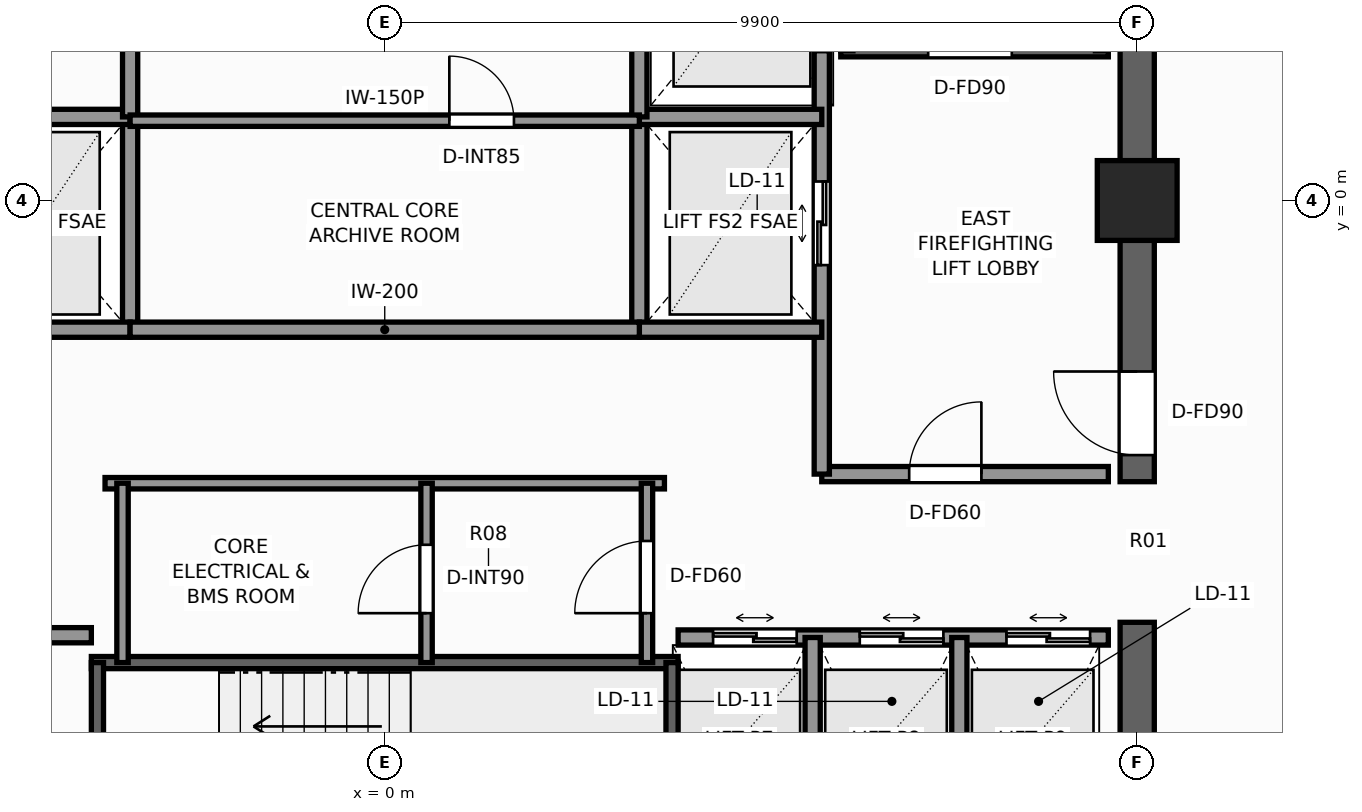
"""IFC4 building model, lengths in metres.
Left out: names, types, materials, properties, quantities, classifications, styles, units other than length and angle.
Written with IfcOpenShell. Run it as: python <this file> out.ifc"""

import sys

from ifc_helpers import new_model, si_unit, direction, frame, frame_2d, origin, origin_2d, place, context, subcontext, project, spatial, rectangle, extrude, element, fill, save


model = new_model("IFC4")
c1 = context("Model", 3, precision=1e-05, world=origin(), true_north=direction((0.0, 1.0)))
c2 = subcontext(c1, "Body", "Model", "MODEL_VIEW")
j1 = project(units=[si_unit("LENGTHUNIT", "METRE"), si_unit("PLANEANGLEUNIT", "RADIAN")], contexts=[c1])
p1 = place(None, origin())
s1 = spatial("IfcSite", under=j1, at=p1, CompositionType="ELEMENT")
p2 = place(p1, origin())
s2 = spatial("IfcBuilding", under=s1, at=p2, CompositionType="ELEMENT")
p3 = place(p2, frame((0.0, 0.0, 237.4)))
s3 = spatial("IfcBuildingStorey", under=s2, at=p3, CompositionType="ELEMENT", Elevation=237.4)
p4 = place(p3, frame((9.9, -9.675, 0.0), z_axis=(0.0, 0.0, 1.0), x_axis=(0.0, 1.0, 0.0)))
e1 = element("IfcWall", 1, at=p4, inside=s3, PredefinedType="SHEAR", context=c2, shape_type="SweptSolid", body=[
    extrude(rectangle(XDim=4.125, YDim=0.45, at=frame_2d((2.062, 0.0))), origin(), (0.0, 0.0, 1.0), 3.5),
])
p5 = place(p3, frame((9.9, -3.7, 0.0), z_axis=(0.0, 0.0, 1.0), x_axis=(0.0, 1.0, 0.0)))
e2 = element("IfcWall", 2, at=p5, inside=s3, PredefinedType="SHEAR", context=c2, shape_type="SweptSolid", body=[
    extrude(rectangle(XDim=13.375, YDim=0.45, at=frame_2d((6.688, 0.0))), origin(), (0.0, 0.0, 1.0), 3.5),
])
p6 = place(p5, frame((0.35, 0.0, 0.0)))
e3 = element("IfcOpeningElement", 3, at=p6, cuts=e2, PredefinedType="OPENING", context=c2, shape_type="SweptSolid", body=[
    extrude(rectangle(XDim=1.1, YDim=2.2, at=frame_2d((0.55, 1.1))), frame((0.0, 0.235, 0.0), z_axis=(0.0, -1.0, 0.0), x_axis=(1.0, 0.0, 0.0)), (0.0, 0.0, 1.0), 0.47),
])
p7 = place(p3, frame((9.9, 0.0, 0.0), z_axis=(0.0, 0.0, 1.0), x_axis=(1.0, 0.0, 0.0)))
e4 = element("IfcColumn", 4, at=p7, inside=s3, PredefinedType="COLUMN", context=c2, shape_type="SweptSolid", body=[
    extrude(rectangle(XDim=1.05, YDim=1.05, at=origin_2d()), origin(), (0.0, 0.0, 1.0), 3.5),
])
p8 = place(p3, frame((6.0, 1.97, 0.0), z_axis=(0.0, 0.0, 1.0), x_axis=(1.0, 0.0, 0.0)))
e5 = element("IfcWall", 5, at=p8, inside=s3, PredefinedType="SHEAR", context=c2, shape_type="SweptSolid", body=[
    extrude(rectangle(XDim=3.52, YDim=0.16, at=frame_2d((1.76, 0.0))), origin(), (0.0, 0.0, 1.0), 3.5),
])
p9 = place(p8, frame((1.15, 0.0, 0.0)))
e6 = element("IfcOpeningElement", 6, at=p9, cuts=e5, PredefinedType="OPENING", context=c2, shape_type="SweptSolid", body=[
    extrude(rectangle(XDim=1.1, YDim=2.2, at=frame_2d((0.55, 1.1))), frame((0.0, 0.09, 0.0), z_axis=(0.0, -1.0, 0.0), x_axis=(1.0, 0.0, 0.0)), (0.0, 0.0, 1.0), 0.18),
])
p10 = place(p3, frame((-3.86, -6.08, 0.0), z_axis=(0.0, 0.0, 1.0), x_axis=(1.0, 0.0, 0.0)))
e7 = element("IfcWall", 7, at=p10, inside=s3, PredefinedType="SHEAR", context=c2, shape_type="SweptSolid", body=[
    extrude(rectangle(XDim=7.72, YDim=0.16, at=frame_2d((3.86, 0.0))), origin(), (0.0, 0.0, 1.0), 3.5),
])
for number, where, z_axis, x_axis in (
    (8, (-3.78, -9.43, 0.0), (0.0, 0.0, 1.0), (0.0, 1.0, 0.0)),
    (9, (3.78, -9.43, 0.0), (0.0, 0.0, 1.0), (0.0, 1.0, 0.0)),
):
    element("IfcWall", number, at=place(p3, frame(where, z_axis=z_axis, x_axis=x_axis)), inside=s3, PredefinedType="SHEAR", context=c2, shape_type="SweptSolid", body=[
        extrude(rectangle(XDim=3.35, YDim=0.16, at=frame_2d((1.675, 0.0))), origin(), (0.0, 0.0, 1.0), 3.5),
    ])
p11 = place(p3, frame((-3.35, -1.7, 0.0), z_axis=(0.0, 0.0, 1.0), x_axis=(0.0, 1.0, 0.0)))
e10 = element("IfcWall", 10, at=p11, inside=s3, PredefinedType="SOLIDWALL", context=c2, shape_type="SweptSolid", body=[
    extrude(rectangle(XDim=2.8, YDim=0.2, at=frame_2d((1.4, 0.0))), origin(), (0.0, 0.0, 1.0), 3.25),
])
for number, where, z_axis, x_axis in (
    (11, (-5.75, -1.7, 0.0), (0.0, 0.0, 1.0), (1.0, 0.0, 0.0)),
    (12, (-5.75, 1.1, 0.0), (0.0, 0.0, 1.0), (1.0, 0.0, 0.0)),
):
    element("IfcWall", number, at=place(p3, frame(where, z_axis=z_axis, x_axis=x_axis)), inside=s3, PredefinedType="SOLIDWALL", context=c2, shape_type="SweptSolid", body=[
        extrude(rectangle(XDim=2.4, YDim=0.2, at=frame_2d((1.2, 0.0))), origin(), (0.0, 0.0, 1.0), 3.25),
    ])
p12 = place(p3, frame((5.75, -3.6, 0.0), z_axis=(0.0, 0.0, 1.0), x_axis=(1.0, 0.0, 0.0)))
e13 = element("IfcWall", 13, at=p12, inside=s3, PredefinedType="SOLIDWALL", context=c2, shape_type="SweptSolid", body=[
    extrude(rectangle(XDim=3.77, YDim=0.2, at=frame_2d((1.885, 0.0))), origin(), (0.0, 0.0, 1.0), 3.25),
])
p13 = place(p12, frame((1.15, 0.0, 0.0)))
e14 = element("IfcOpeningElement", 14, at=p13, cuts=e13, PredefinedType="OPENING", context=c2, shape_type="SweptSolid", body=[
    extrude(rectangle(XDim=0.95, YDim=2.06, at=frame_2d((0.475, 1.03))), frame((0.0, 0.11, 0.0), z_axis=(0.0, -1.0, 0.0), x_axis=(1.0, 0.0, 0.0)), (0.0, 0.0, 1.0), 0.22),
])
p14 = place(p3, frame((5.75, -3.6, 0.0), z_axis=(0.0, 0.0, 1.0), x_axis=(0.0, 1.0, 0.0)))
e15 = element("IfcWall", 15, at=p14, inside=s3, PredefinedType="SOLIDWALL", context=c2, shape_type="SweptSolid", body=[
    extrude(rectangle(XDim=5.57, YDim=0.2, at=frame_2d((2.785, 0.0))), origin(), (0.0, 0.0, 1.0), 3.25),
])
p15 = place(p14, frame((2.75, 0.0, 0.0)))
e16 = element("IfcOpeningElement", 16, at=p15, cuts=e15, PredefinedType="OPENING", context=c2, shape_type="SweptSolid", body=[
    extrude(rectangle(XDim=1.1, YDim=2.2, at=frame_2d((0.55, 1.1))), frame((0.0, 0.11, 0.0), z_axis=(0.0, -1.0, 0.0), x_axis=(1.0, 0.0, 0.0)), (0.0, 0.0, 1.0), 0.22),
])
p16 = place(p3, frame((3.35, -1.7, 0.0), z_axis=(0.0, 0.0, 1.0), x_axis=(0.0, 1.0, 0.0)))
e17 = element("IfcWall", 17, at=p16, inside=s3, PredefinedType="SOLIDWALL", context=c2, shape_type="SweptSolid", body=[
    extrude(rectangle(XDim=2.8, YDim=0.2, at=frame_2d((1.4, 0.0))), origin(), (0.0, 0.0, 1.0), 3.25),
])
for number, where, z_axis, x_axis in (
    (18, (3.35, -1.7, 0.0), (0.0, 0.0, 1.0), (1.0, 0.0, 0.0)),
    (19, (3.35, 1.1, 0.0), (0.0, 0.0, 1.0), (1.0, 0.0, 0.0)),
):
    element("IfcWall", number, at=place(p3, frame(where, z_axis=z_axis, x_axis=x_axis)), inside=s3, PredefinedType="SOLIDWALL", context=c2, shape_type="SweptSolid", body=[
        extrude(rectangle(XDim=2.4, YDim=0.2, at=frame_2d((1.2, 0.0))), origin(), (0.0, 0.0, 1.0), 3.25),
    ])
p17 = place(p3, frame((-9.52, -5.72, 0.0), z_axis=(0.0, 0.0, 1.0), x_axis=(1.0, 0.0, 0.0)))
e20 = element("IfcWall", 20, at=p17, inside=s3, PredefinedType="SOLIDWALL", context=c2, shape_type="SweptSolid", body=[
    extrude(rectangle(XDim=5.66, YDim=0.2, at=frame_2d((2.83, 0.0))), origin(), (0.0, 0.0, 1.0), 3.25),
])
p18 = place(p17, frame((3.6, 0.0, 0.0)))
e21 = element("IfcOpeningElement", 21, at=p18, cuts=e20, PredefinedType="OPENING", context=c2, shape_type="SweptSolid", body=[
    extrude(rectangle(XDim=0.95, YDim=2.06, at=frame_2d((0.475, 1.03))), frame((0.0, 0.11, 0.0), z_axis=(0.0, -1.0, 0.0), x_axis=(1.0, 0.0, 0.0)), (0.0, 0.0, 1.0), 0.22),
])
p19 = place(p3, frame((3.86, -5.75, 0.0), z_axis=(0.0, 0.0, 1.0), x_axis=(1.0, 0.0, 0.0)))
e22 = element("IfcWall", 22, at=p19, inside=s3, PredefinedType="SOLIDWALL", context=c2, shape_type="SweptSolid", body=[
    extrude(rectangle(XDim=5.66, YDim=0.2, at=frame_2d((2.83, 0.0))), origin(), (0.0, 0.0, 1.0), 3.25),
])
p20 = place(p19, frame((0.46, 0.0, 0.0)))
e23 = element("IfcOpeningElement", 23, at=p20, cuts=e22, PredefinedType="OPENING", context=c2, shape_type="SweptSolid", body=[
    extrude(rectangle(XDim=1.1, YDim=2.2, at=frame_2d((0.55, 1.1))), frame((0.0, 0.11, 0.0), z_axis=(0.0, -1.0, 0.0), x_axis=(1.0, 0.0, 0.0)), (0.0, 0.0, 1.0), 0.22),
])
p21 = place(p19, frame((2.39, 0.0, 0.0)))
e24 = element("IfcOpeningElement", 24, at=p21, cuts=e22, PredefinedType="OPENING", context=c2, shape_type="SweptSolid", body=[
    extrude(rectangle(XDim=1.1, YDim=2.2, at=frame_2d((0.55, 1.1))), frame((0.0, 0.11, 0.0), z_axis=(0.0, -1.0, 0.0), x_axis=(1.0, 0.0, 0.0)), (0.0, 0.0, 1.0), 0.22),
])
p22 = place(p19, frame((4.32, 0.0, 0.0)))
e25 = element("IfcOpeningElement", 25, at=p22, cuts=e22, PredefinedType="OPENING", context=c2, shape_type="SweptSolid", body=[
    extrude(rectangle(XDim=1.1, YDim=2.2, at=frame_2d((0.55, 1.1))), frame((0.0, 0.11, 0.0), z_axis=(0.0, -1.0, 0.0), x_axis=(1.0, 0.0, 0.0)), (0.0, 0.0, 1.0), 0.22),
])
for number, where, z_axis, x_axis in (
    (26, (5.63, -9.52, 0.0), (0.0, 0.0, 1.0), (0.0, 1.0, 0.0)),
    (27, (7.56, -9.52, 0.0), (0.0, 0.0, 1.0), (0.0, 1.0, 0.0)),
):
    element("IfcWall", number, at=place(p3, frame(where, z_axis=z_axis, x_axis=x_axis)), inside=s3, PredefinedType="SOLIDWALL", context=c2, shape_type="SweptSolid", body=[
        extrude(rectangle(XDim=3.77, YDim=0.2, at=frame_2d((1.885, 0.0))), origin(), (0.0, 0.0, 1.0), 3.25),
    ])
p23 = place(p3, frame((-3.35, -1.7, 0.0), z_axis=(0.0, 0.0, 1.0), x_axis=(1.0, 0.0, 0.0)))
e28 = element("IfcWall", 28, at=p23, inside=s3, PredefinedType="SOLIDWALL", context=c2, shape_type="SweptSolid", body=[
    extrude(rectangle(XDim=6.7, YDim=0.2, at=frame_2d((3.35, 0.0))), origin(), (0.0, 0.0, 1.0), 3.25),
])
for number, where, z_axis, x_axis in (
    (29, (-3.35, 1.1, 0.0), (0.0, 0.0, 1.0), (0.0, 1.0, 0.0)),
    (30, (3.35, 1.1, 0.0), (0.0, 0.0, 1.0), (0.0, 1.0, 0.0)),
):
    element("IfcWall", number, at=place(p3, frame(where, z_axis=z_axis, x_axis=x_axis)), inside=s3, PredefinedType="SOLIDWALL", context=c2, shape_type="SweptSolid", body=[
        extrude(rectangle(XDim=3.2, YDim=0.2, at=frame_2d((1.6, 0.0))), origin(), (0.0, 0.0, 1.0), 3.25),
    ])
p24 = place(p3, frame((-3.35, 1.05, 0.0), z_axis=(0.0, 0.0, 1.0), x_axis=(1.0, 0.0, 0.0)))
e31 = element("IfcWall", 31, at=p24, inside=s3, PredefinedType="PARTITIONING", context=c2, shape_type="SweptSolid", body=[
    extrude(rectangle(XDim=6.7, YDim=0.15, at=frame_2d((3.35, 0.0))), origin(), (0.0, 0.0, 1.0), 3.25),
])
p25 = place(p24, frame((4.2, 0.0, 0.0)))
e32 = element("IfcOpeningElement", 32, at=p25, cuts=e31, PredefinedType="OPENING", context=c2, shape_type="SweptSolid", body=[
    extrude(rectangle(XDim=0.85, YDim=2.03, at=frame_2d((0.425, 1.015))), frame((0.0, 0.085, 0.0), z_axis=(0.0, -1.0, 0.0), x_axis=(1.0, 0.0, 0.0)), (0.0, 0.0, 1.0), 0.17),
])
p26 = place(p3, frame((-3.68, -3.72, 0.0), z_axis=(0.0, 0.0, 1.0), x_axis=(1.0, 0.0, 0.0)))
e33 = element("IfcWall", 33, at=p26, inside=s3, PredefinedType="PARTITIONING", context=c2, shape_type="SweptSolid", body=[
    extrude(rectangle(XDim=7.36, YDim=0.15, at=frame_2d((3.68, 0.0))), origin(), (0.0, 0.0, 1.0), 3.25),
])
p27 = place(p3, frame((3.45, -6.08, 0.0), z_axis=(0.0, 0.0, 1.0), x_axis=(0.0, 1.0, 0.0)))
e34 = element("IfcWall", 34, at=p27, inside=s3, PredefinedType="PARTITIONING", context=c2, shape_type="SweptSolid", body=[
    extrude(rectangle(XDim=2.36, YDim=0.15, at=frame_2d((1.18, 0.0))), origin(), (0.0, 0.0, 1.0), 3.25),
])
p28 = place(p27, frame((0.65, 0.0, 0.0)))
e35 = element("IfcOpeningElement", 35, at=p28, cuts=e34, PredefinedType="OPENING", context=c2, shape_type="SweptSolid", body=[
    extrude(rectangle(XDim=0.95, YDim=2.06, at=frame_2d((0.475, 1.03))), frame((0.0, 0.085, 0.0), z_axis=(0.0, -1.0, 0.0), x_axis=(1.0, 0.0, 0.0)), (0.0, 0.0, 1.0), 0.17),
])
p29 = place(p3, frame((-3.45, -6.08, 0.0), z_axis=(0.0, 0.0, 1.0), x_axis=(0.0, 1.0, 0.0)))
e36 = element("IfcWall", 36, at=p29, inside=s3, PredefinedType="PARTITIONING", context=c2, shape_type="SweptSolid", body=[
    extrude(rectangle(XDim=2.36, YDim=0.15, at=frame_2d((1.18, 0.0))), origin(), (0.0, 0.0, 1.0), 3.25),
])
p30 = place(p3, frame((0.55, -6.08, 0.0), z_axis=(0.0, 0.0, 1.0), x_axis=(0.0, 1.0, 0.0)))
e37 = element("IfcWall", 37, at=p30, inside=s3, PredefinedType="PARTITIONING", context=c2, shape_type="SweptSolid", body=[
    extrude(rectangle(XDim=2.36, YDim=0.15, at=frame_2d((1.18, 0.0))), origin(), (0.0, 0.0, 1.0), 3.25),
])
p31 = place(p30, frame((0.65, 0.0, 0.0)))
e38 = element("IfcOpeningElement", 38, at=p31, cuts=e37, PredefinedType="OPENING", context=c2, shape_type="SweptSolid", body=[
    extrude(rectangle(XDim=0.9, YDim=2.06, at=frame_2d((0.45, 1.03))), frame((0.0, 0.085, 0.0), z_axis=(0.0, -1.0, 0.0), x_axis=(1.0, 0.0, 0.0)), (0.0, 0.0, 1.0), 0.17),
])
p32 = place(p9, origin())
e39 = element("IfcDoor", 39, at=p32, inside=s3, OperationType="SINGLE_SWING_RIGHT", PredefinedType="DOOR", context=c2, shape_type="SweptSolid", body=[
    extrude(rectangle(XDim=1.1, YDim=2.2, at=frame_2d((0.55, 1.1))), frame((0.0, 0.025, 0.0), z_axis=(0.0, -1.0, 0.0), x_axis=(1.0, 0.0, 0.0)), (0.0, 0.0, 1.0), 0.05),
])
fill(e6, e39)
p33 = place(p6, origin())
e40 = element("IfcDoor", 40, at=p33, inside=s3, OperationType="SINGLE_SWING_RIGHT", PredefinedType="DOOR", context=c2, shape_type="SweptSolid", body=[
    extrude(rectangle(XDim=1.1, YDim=2.2, at=frame_2d((0.55, 1.1))), frame((0.0, 0.025, 0.0), z_axis=(0.0, -1.0, 0.0), x_axis=(1.0, 0.0, 0.0)), (0.0, 0.0, 1.0), 0.05),
])
fill(e3, e40)
p34 = place(p15, origin())
e41 = element("IfcDoor", 41, at=p34, inside=s3, OperationType="DOUBLE_DOOR_SLIDING", PredefinedType="DOOR", context=c2, shape_type="SweptSolid", body=[
    extrude(rectangle(XDim=1.1, YDim=2.2, at=frame_2d((0.55, 1.1))), frame((0.0, 0.025, 0.0), z_axis=(0.0, -1.0, 0.0), x_axis=(1.0, 0.0, 0.0)), (0.0, 0.0, 1.0), 0.05),
])
fill(e16, e41)
p35 = place(p20, origin())
e42 = element("IfcDoor", 42, at=p35, inside=s3, OperationType="DOUBLE_DOOR_SLIDING", PredefinedType="DOOR", context=c2, shape_type="SweptSolid", body=[
    extrude(rectangle(XDim=1.1, YDim=2.2, at=frame_2d((0.55, 1.1))), frame((0.0, 0.025, 0.0), z_axis=(0.0, -1.0, 0.0), x_axis=(1.0, 0.0, 0.0)), (0.0, 0.0, 1.0), 0.05),
])
fill(e23, e42)
p36 = place(p21, origin())
e43 = element("IfcDoor", 43, at=p36, inside=s3, OperationType="DOUBLE_DOOR_SLIDING", PredefinedType="DOOR", context=c2, shape_type="SweptSolid", body=[
    extrude(rectangle(XDim=1.1, YDim=2.2, at=frame_2d((0.55, 1.1))), frame((0.0, 0.025, 0.0), z_axis=(0.0, -1.0, 0.0), x_axis=(1.0, 0.0, 0.0)), (0.0, 0.0, 1.0), 0.05),
])
fill(e24, e43)
p37 = place(p22, origin())
e44 = element("IfcDoor", 44, at=p37, inside=s3, OperationType="DOUBLE_DOOR_SLIDING", PredefinedType="DOOR", context=c2, shape_type="SweptSolid", body=[
    extrude(rectangle(XDim=1.1, YDim=2.2, at=frame_2d((0.55, 1.1))), frame((0.0, 0.025, 0.0), z_axis=(0.0, -1.0, 0.0), x_axis=(1.0, 0.0, 0.0)), (0.0, 0.0, 1.0), 0.05),
])
fill(e25, e44)
p38 = place(p13, origin())
e45 = element("IfcDoor", 45, at=p38, inside=s3, OperationType="SINGLE_SWING_RIGHT", PredefinedType="DOOR", context=c2, shape_type="SweptSolid", body=[
    extrude(rectangle(XDim=0.95, YDim=2.06, at=frame_2d((0.475, 1.03))), frame((0.0, 0.025, 0.0), z_axis=(0.0, -1.0, 0.0), x_axis=(1.0, 0.0, 0.0)), (0.0, 0.0, 1.0), 0.05),
])
fill(e14, e45)
p39 = place(p25, origin())
e46 = element("IfcDoor", 46, at=p39, inside=s3, OperationType="SINGLE_SWING_LEFT", PredefinedType="DOOR", context=c2, shape_type="SweptSolid", body=[
    extrude(rectangle(XDim=0.85, YDim=2.03, at=frame_2d((0.425, 1.015))), frame((0.0, 0.025, 0.0), z_axis=(0.0, -1.0, 0.0), x_axis=(1.0, 0.0, 0.0)), (0.0, 0.0, 1.0), 0.05),
])
fill(e32, e46)
p40 = place(p28, origin())
e47 = element("IfcDoor", 47, at=p40, inside=s3, OperationType="SINGLE_SWING_LEFT", PredefinedType="DOOR", context=c2, shape_type="SweptSolid", body=[
    extrude(rectangle(XDim=0.95, YDim=2.06, at=frame_2d((0.475, 1.03))), frame((0.0, 0.025, 0.0), z_axis=(0.0, -1.0, 0.0), x_axis=(1.0, 0.0, 0.0)), (0.0, 0.0, 1.0), 0.05),
])
fill(e35, e47)
p41 = place(p31, origin())
e48 = element("IfcDoor", 48, at=p41, inside=s3, OperationType="SINGLE_SWING_LEFT", PredefinedType="DOOR", context=c2, shape_type="SweptSolid", body=[
    extrude(rectangle(XDim=0.9, YDim=2.06, at=frame_2d((0.45, 1.03))), frame((0.0, 0.025, 0.0), z_axis=(0.0, -1.0, 0.0), x_axis=(1.0, 0.0, 0.0)), (0.0, 0.0, 1.0), 0.05),
])
fill(e38, e48)
save(model, sys.argv[1])
